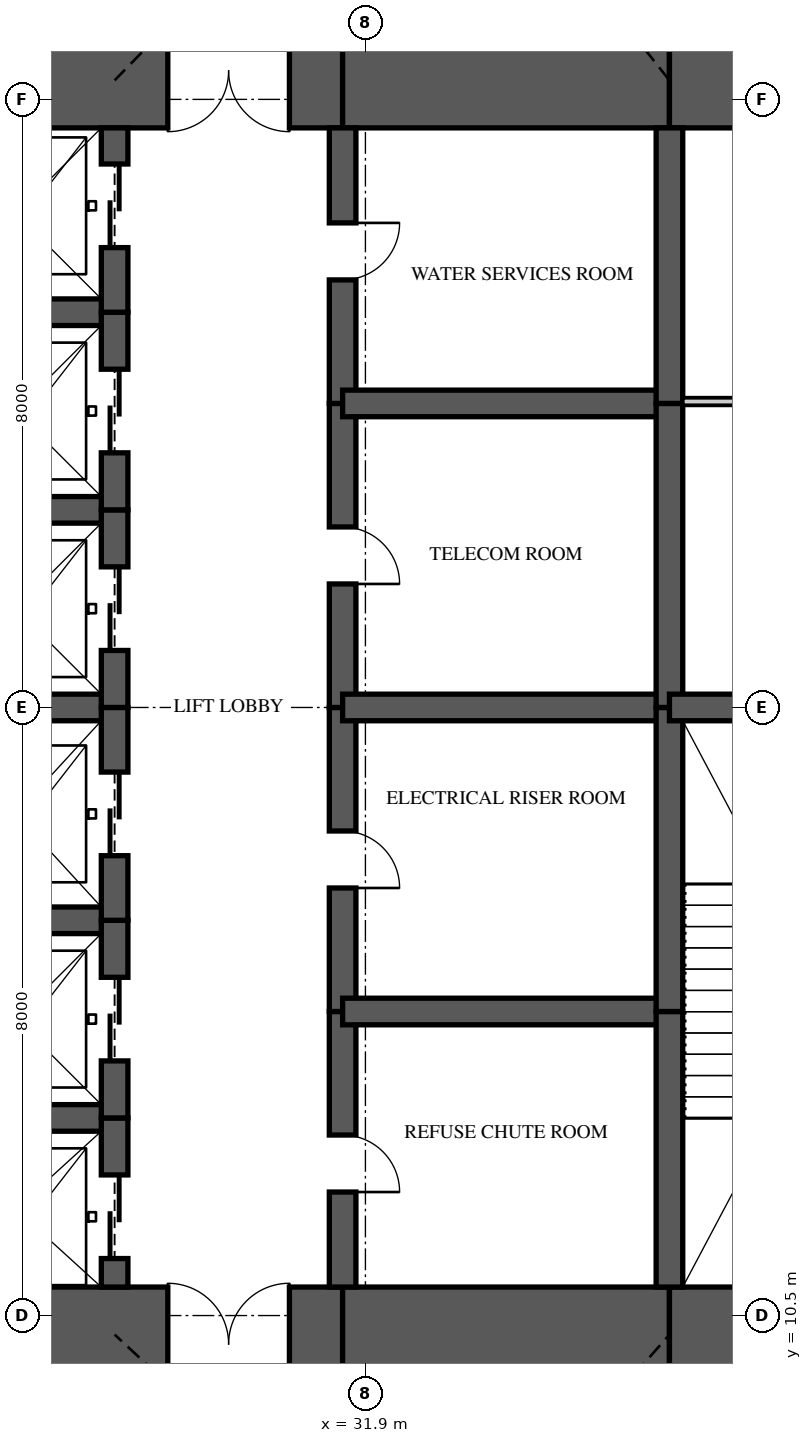
"""IFC4 building model, lengths in metres.
Left out: names, types, materials, properties, quantities, classifications, styles, units other than length and angle.
Written with IfcOpenShell. Run it as: python <this file> out.ifc"""

import sys

from ifc_helpers import new_model, si_unit, direction, frame, frame_2d, origin, place, context, subcontext, project, spatial, rectangle, extrude, element, fill, save


model = new_model("IFC4")
c1 = context("Model", 3, precision=1e-05, world=origin(), true_north=direction((0.0, 1.0)))
c2 = subcontext(c1, "Body", "Model", "MODEL_VIEW")
j1 = project(units=[si_unit("LENGTHUNIT", "METRE"), si_unit("PLANEANGLEUNIT", "RADIAN")], contexts=[c1])
p1 = place(None, origin())
s1 = spatial("IfcSite", under=j1, at=p1, CompositionType="ELEMENT")
p2 = place(p1, origin())
s2 = spatial("IfcBuilding", under=s1, at=p2, CompositionType="ELEMENT")
p3 = place(p2, frame((0.0, 0.0, 138.35)))
s3 = spatial("IfcBuildingStorey", under=s2, at=p3, CompositionType="ELEMENT", Elevation=138.35)
p4 = place(p3, frame((26.0, 10.125, 0.0), z_axis=(0.0, 0.0, 1.0), x_axis=(1.0, 0.0, 0.0)))
e1 = element("IfcWall", 1, at=p4, inside=s3, PredefinedType="SHEAR", context=c2, shape_type="SweptSolid", body=[
    extrude(rectangle(XDim=5.6, YDim=1.5, at=frame_2d((2.8, 0.0))), origin(), (0.0, 0.0, 1.0), 6.0),
])
p5 = place(p4, frame((3.3, 0.0, 0.0)))
e2 = element("IfcOpeningElement", 2, at=p5, cuts=e1, PredefinedType="OPENING", context=c2, shape_type="SweptSolid", body=[
    extrude(rectangle(XDim=1.6, YDim=2.1, at=frame_2d((0.8, 1.05))), frame((0.0, 0.76, 0.0), z_axis=(0.0, -1.0, 0.0), x_axis=(1.0, 0.0, 0.0)), (0.0, 0.0, 1.0), 1.52),
])
p6 = place(p3, frame((31.6, 10.125, 0.0), z_axis=(0.0, 0.0, 1.0), x_axis=(1.0, 0.0, 0.0)))
e3 = element("IfcWall", 3, at=p6, inside=s3, PredefinedType="SHEAR", context=c2, shape_type="SweptSolid", body=[
    extrude(rectangle(XDim=4.3, YDim=1.5, at=frame_2d((2.15, 0.0))), origin(), (0.0, 0.0, 1.0), 6.0),
])
p7 = place(p3, frame((35.9, 10.125, 0.0), z_axis=(0.0, 0.0, 1.0), x_axis=(1.0, 0.0, 0.0)))
e4 = element("IfcWall", 4, at=p7, inside=s3, PredefinedType="SHEAR", context=c2, shape_type="SweptSolid", body=[
    extrude(rectangle(XDim=8.325, YDim=1.5, at=frame_2d((4.163, 0.0))), origin(), (0.0, 0.0, 1.0), 6.0),
])
p8 = place(p7, frame((2.7, 0.0, 0.0)))
e5 = element("IfcOpeningElement", 5, at=p8, cuts=e4, PredefinedType="OPENING", context=c2, shape_type="SweptSolid", body=[
    extrude(rectangle(XDim=1.0, YDim=2.1, at=frame_2d((0.5, 1.05))), frame((0.0, 0.76, 0.0), z_axis=(0.0, -1.0, 0.0), x_axis=(1.0, 0.0, 0.0)), (0.0, 0.0, 1.0), 1.52),
])
p9 = place(p3, frame((44.225, 26.875, 0.0), z_axis=(0.0, 0.0, 1.0), x_axis=(-1.0, 0.0, 0.0)))
e6 = element("IfcWall", 6, at=p9, inside=s3, PredefinedType="SHEAR", context=c2, shape_type="SweptSolid", body=[
    extrude(rectangle(XDim=8.325, YDim=1.5, at=frame_2d((4.163, 0.0))), origin(), (0.0, 0.0, 1.0), 6.0),
])
p10 = place(p9, frame((5.725, 0.0, 0.0)))
e7 = element("IfcOpeningElement", 7, at=p10, cuts=e6, PredefinedType="OPENING", context=c2, shape_type="SweptSolid", body=[
    extrude(rectangle(XDim=0.9, YDim=2.1, at=frame_2d((0.45, 1.05))), frame((0.0, 0.76, 0.0), z_axis=(0.0, -1.0, 0.0), x_axis=(1.0, 0.0, 0.0)), (0.0, 0.0, 1.0), 1.52),
])
p11 = place(p3, frame((35.9, 26.875, 0.0), z_axis=(0.0, 0.0, 1.0), x_axis=(-1.0, 0.0, 0.0)))
e8 = element("IfcWall", 8, at=p11, inside=s3, PredefinedType="SHEAR", context=c2, shape_type="SweptSolid", body=[
    extrude(rectangle(XDim=4.3, YDim=1.5, at=frame_2d((2.15, 0.0))), origin(), (0.0, 0.0, 1.0), 6.0),
])
p12 = place(p3, frame((31.6, 26.875, 0.0), z_axis=(0.0, 0.0, 1.0), x_axis=(-1.0, 0.0, 0.0)))
e9 = element("IfcWall", 9, at=p12, inside=s3, PredefinedType="SHEAR", context=c2, shape_type="SweptSolid", body=[
    extrude(rectangle(XDim=5.6, YDim=1.5, at=frame_2d((2.8, 0.0))), origin(), (0.0, 0.0, 1.0), 6.0),
])
p13 = place(p12, frame((0.7, 0.0, 0.0)))
e10 = element("IfcOpeningElement", 10, at=p13, cuts=e9, PredefinedType="OPENING", context=c2, shape_type="SweptSolid", body=[
    extrude(rectangle(XDim=1.6, YDim=2.1, at=frame_2d((0.8, 1.05))), frame((0.0, 0.76, 0.0), z_axis=(0.0, -1.0, 0.0), x_axis=(1.0, 0.0, 0.0)), (0.0, 0.0, 1.0), 1.52),
])
p14 = place(p3, frame((28.6, 10.875, 0.0), z_axis=(0.0, 0.0, 1.0), x_axis=(0.0, 1.0, 0.0)))
e11 = element("IfcWall", 11, at=p14, inside=s3, PredefinedType="SHEAR", context=c2, shape_type="SweptSolid", body=[
    extrude(rectangle(XDim=2.225, YDim=0.35, at=frame_2d((1.113, 0.0))), origin(), (0.0, 0.0, 1.0), 6.0),
])
p15 = place(p14, frame((0.375, 0.0, 0.0)))
e12 = element("IfcOpeningElement", 12, at=p15, cuts=e11, PredefinedType="OPENING", context=c2, shape_type="SweptSolid", body=[
    extrude(rectangle(XDim=1.1, YDim=2.1, at=frame_2d((0.55, 1.05))), frame((0.0, 0.185, 0.0), z_axis=(0.0, -1.0, 0.0), x_axis=(1.0, 0.0, 0.0)), (0.0, 0.0, 1.0), 0.37),
])
p16 = place(p3, frame((28.6, 13.1, 0.0), z_axis=(0.0, 0.0, 1.0), x_axis=(0.0, 1.0, 0.0)))
e13 = element("IfcWall", 13, at=p16, inside=s3, PredefinedType="SHEAR", context=c2, shape_type="SweptSolid", body=[
    extrude(rectangle(XDim=2.6, YDim=0.35, at=frame_2d((1.3, 0.0))), origin(), (0.0, 0.0, 1.0), 6.0),
])
p17 = place(p16, frame((0.75, 0.0, 0.0)))
e14 = element("IfcOpeningElement", 14, at=p17, cuts=e13, PredefinedType="OPENING", context=c2, shape_type="SweptSolid", body=[
    extrude(rectangle(XDim=1.1, YDim=2.1, at=frame_2d((0.55, 1.05))), frame((0.0, 0.185, 0.0), z_axis=(0.0, -1.0, 0.0), x_axis=(1.0, 0.0, 0.0)), (0.0, 0.0, 1.0), 0.37),
])
p18 = place(p3, frame((28.6, 15.7, 0.0), z_axis=(0.0, 0.0, 1.0), x_axis=(0.0, 1.0, 0.0)))
e15 = element("IfcWall", 15, at=p18, inside=s3, PredefinedType="SHEAR", context=c2, shape_type="SweptSolid", body=[
    extrude(rectangle(XDim=2.8, YDim=0.35, at=frame_2d((1.4, 0.0))), origin(), (0.0, 0.0, 1.0), 6.0),
])
p19 = place(p18, frame((0.85, 0.0, 0.0)))
e16 = element("IfcOpeningElement", 16, at=p19, cuts=e15, PredefinedType="OPENING", context=c2, shape_type="SweptSolid", body=[
    extrude(rectangle(XDim=1.1, YDim=2.1, at=frame_2d((0.55, 1.05))), frame((0.0, 0.185, 0.0), z_axis=(0.0, -1.0, 0.0), x_axis=(1.0, 0.0, 0.0)), (0.0, 0.0, 1.0), 0.37),
])
p20 = place(p3, frame((28.6, 18.5, 0.0), z_axis=(0.0, 0.0, 1.0), x_axis=(0.0, 1.0, 0.0)))
e17 = element("IfcWall", 17, at=p20, inside=s3, PredefinedType="SHEAR", context=c2, shape_type="SweptSolid", body=[
    extrude(rectangle(XDim=2.6, YDim=0.35, at=frame_2d((1.3, 0.0))), origin(), (0.0, 0.0, 1.0), 6.0),
])
p21 = place(p20, frame((0.75, 0.0, 0.0)))
e18 = element("IfcOpeningElement", 18, at=p21, cuts=e17, PredefinedType="OPENING", context=c2, shape_type="SweptSolid", body=[
    extrude(rectangle(XDim=1.1, YDim=2.1, at=frame_2d((0.55, 1.05))), frame((0.0, 0.185, 0.0), z_axis=(0.0, -1.0, 0.0), x_axis=(1.0, 0.0, 0.0)), (0.0, 0.0, 1.0), 0.37),
])
p22 = place(p3, frame((28.6, 21.1, 0.0), z_axis=(0.0, 0.0, 1.0), x_axis=(0.0, 1.0, 0.0)))
e19 = element("IfcWall", 19, at=p22, inside=s3, PredefinedType="SHEAR", context=c2, shape_type="SweptSolid", body=[
    extrude(rectangle(XDim=2.6, YDim=0.35, at=frame_2d((1.3, 0.0))), origin(), (0.0, 0.0, 1.0), 6.0),
])
p23 = place(p22, frame((0.75, 0.0, 0.0)))
e20 = element("IfcOpeningElement", 20, at=p23, cuts=e19, PredefinedType="OPENING", context=c2, shape_type="SweptSolid", body=[
    extrude(rectangle(XDim=1.1, YDim=2.1, at=frame_2d((0.55, 1.05))), frame((0.0, 0.185, 0.0), z_axis=(0.0, -1.0, 0.0), x_axis=(1.0, 0.0, 0.0)), (0.0, 0.0, 1.0), 0.37),
])
p24 = place(p3, frame((28.6, 23.7, 0.0), z_axis=(0.0, 0.0, 1.0), x_axis=(0.0, 1.0, 0.0)))
e21 = element("IfcWall", 21, at=p24, inside=s3, PredefinedType="SHEAR", context=c2, shape_type="SweptSolid", body=[
    extrude(rectangle(XDim=2.425, YDim=0.35, at=frame_2d((1.212, 0.0))), origin(), (0.0, 0.0, 1.0), 6.0),
])
p25 = place(p24, frame((0.85, 0.0, 0.0)))
e22 = element("IfcOpeningElement", 22, at=p25, cuts=e21, PredefinedType="OPENING", context=c2, shape_type="SweptSolid", body=[
    extrude(rectangle(XDim=1.1, YDim=2.1, at=frame_2d((0.55, 1.05))), frame((0.0, 0.185, 0.0), z_axis=(0.0, -1.0, 0.0), x_axis=(1.0, 0.0, 0.0)), (0.0, 0.0, 1.0), 0.37),
])
p26 = place(p3, frame((31.6, 10.875, 0.0), z_axis=(0.0, 0.0, 1.0), x_axis=(0.0, 1.0, 0.0)))
e23 = element("IfcWall", 23, at=p26, inside=s3, PredefinedType="SHEAR", context=c2, shape_type="SweptSolid", body=[
    extrude(rectangle(XDim=3.625, YDim=0.35, at=frame_2d((1.812, 0.0))), origin(), (0.0, 0.0, 1.0), 6.0),
])
p27 = place(p26, frame((1.25, 0.0, 0.0)))
e24 = element("IfcOpeningElement", 24, at=p27, cuts=e23, PredefinedType="OPENING", context=c2, shape_type="SweptSolid", body=[
    extrude(rectangle(XDim=0.75, YDim=2.1, at=frame_2d((0.375, 1.05))), frame((0.0, 0.185, 0.0), z_axis=(0.0, -1.0, 0.0), x_axis=(1.0, 0.0, 0.0)), (0.0, 0.0, 1.0), 0.37),
])
p28 = place(p3, frame((31.6, 14.5, 0.0), z_axis=(0.0, 0.0, 1.0), x_axis=(0.0, 1.0, 0.0)))
e25 = element("IfcWall", 25, at=p28, inside=s3, PredefinedType="SHEAR", context=c2, shape_type="SweptSolid", body=[
    extrude(rectangle(XDim=4.0, YDim=0.35, at=frame_2d((2.0, 0.0))), origin(), (0.0, 0.0, 1.0), 6.0),
])
p29 = place(p28, frame((1.625, 0.0, 0.0)))
e26 = element("IfcOpeningElement", 26, at=p29, cuts=e25, PredefinedType="OPENING", context=c2, shape_type="SweptSolid", body=[
    extrude(rectangle(XDim=0.75, YDim=2.1, at=frame_2d((0.375, 1.05))), frame((0.0, 0.185, 0.0), z_axis=(0.0, -1.0, 0.0), x_axis=(1.0, 0.0, 0.0)), (0.0, 0.0, 1.0), 0.37),
])
p30 = place(p3, frame((31.6, 18.5, 0.0), z_axis=(0.0, 0.0, 1.0), x_axis=(0.0, 1.0, 0.0)))
e27 = element("IfcWall", 27, at=p30, inside=s3, PredefinedType="SHEAR", context=c2, shape_type="SweptSolid", body=[
    extrude(rectangle(XDim=4.0, YDim=0.35, at=frame_2d((2.0, 0.0))), origin(), (0.0, 0.0, 1.0), 6.0),
])
p31 = place(p30, frame((1.625, 0.0, 0.0)))
e28 = element("IfcOpeningElement", 28, at=p31, cuts=e27, PredefinedType="OPENING", context=c2, shape_type="SweptSolid", body=[
    extrude(rectangle(XDim=0.75, YDim=2.1, at=frame_2d((0.375, 1.05))), frame((0.0, 0.185, 0.0), z_axis=(0.0, -1.0, 0.0), x_axis=(1.0, 0.0, 0.0)), (0.0, 0.0, 1.0), 0.37),
])
p32 = place(p3, frame((31.6, 22.5, 0.0), z_axis=(0.0, 0.0, 1.0), x_axis=(0.0, 1.0, 0.0)))
e29 = element("IfcWall", 29, at=p32, inside=s3, PredefinedType="SHEAR", context=c2, shape_type="SweptSolid", body=[
    extrude(rectangle(XDim=3.625, YDim=0.35, at=frame_2d((1.812, 0.0))), origin(), (0.0, 0.0, 1.0), 6.0),
])
p33 = place(p32, frame((1.625, 0.0, 0.0)))
e30 = element("IfcOpeningElement", 30, at=p33, cuts=e29, PredefinedType="OPENING", context=c2, shape_type="SweptSolid", body=[
    extrude(rectangle(XDim=0.75, YDim=2.1, at=frame_2d((0.375, 1.05))), frame((0.0, 0.185, 0.0), z_axis=(0.0, -1.0, 0.0), x_axis=(1.0, 0.0, 0.0)), (0.0, 0.0, 1.0), 0.37),
])
p34 = place(p3, frame((35.9, 10.875, 0.0), z_axis=(0.0, 0.0, 1.0), x_axis=(0.0, 1.0, 0.0)))
e31 = element("IfcWall", 31, at=p34, inside=s3, PredefinedType="SHEAR", context=c2, shape_type="SweptSolid", body=[
    extrude(rectangle(XDim=3.625, YDim=0.35, at=frame_2d((1.812, 0.0))), origin(), (0.0, 0.0, 1.0), 6.0),
])
for number, where, z_axis, x_axis in (
    (32, (35.9, 14.5, 0.0), (0.0, 0.0, 1.0), (0.0, 1.0, 0.0)),
    (33, (35.9, 18.5, 0.0), (0.0, 0.0, 1.0), (0.0, 1.0, 0.0)),
):
    element("IfcWall", number, at=place(p3, frame(where, z_axis=z_axis, x_axis=x_axis)), inside=s3, PredefinedType="SHEAR", context=c2, shape_type="SweptSolid", body=[
        extrude(rectangle(XDim=4.0, YDim=0.35, at=frame_2d((2.0, 0.0))), origin(), (0.0, 0.0, 1.0), 6.0),
    ])
p35 = place(p3, frame((35.9, 22.5, 0.0), z_axis=(0.0, 0.0, 1.0), x_axis=(0.0, 1.0, 0.0)))
e34 = element("IfcWall", 34, at=p35, inside=s3, PredefinedType="SHEAR", context=c2, shape_type="SweptSolid", body=[
    extrude(rectangle(XDim=3.625, YDim=0.35, at=frame_2d((1.812, 0.0))), origin(), (0.0, 0.0, 1.0), 6.0),
])
for number, where, z_axis, x_axis in (
    (35, (26.0, 13.1, 0.0), (0.0, 0.0, 1.0), (1.0, 0.0, 0.0)),
    (36, (26.0, 15.7, 0.0), (0.0, 0.0, 1.0), (1.0, 0.0, 0.0)),
    (37, (26.0, 18.5, 0.0), (0.0, 0.0, 1.0), (1.0, 0.0, 0.0)),
    (38, (26.0, 21.1, 0.0), (0.0, 0.0, 1.0), (1.0, 0.0, 0.0)),
    (39, (26.0, 23.7, 0.0), (0.0, 0.0, 1.0), (1.0, 0.0, 0.0)),
):
    element("IfcWall", number, at=place(p3, frame(where, z_axis=z_axis, x_axis=x_axis)), inside=s3, PredefinedType="SHEAR", context=c2, shape_type="SweptSolid", body=[
        extrude(rectangle(XDim=2.6, YDim=0.35, at=frame_2d((1.3, 0.0))), origin(), (0.0, 0.0, 1.0), 6.0),
    ])
for number, where, z_axis, x_axis in (
    (40, (31.6, 14.5, 0.0), (0.0, 0.0, 1.0), (1.0, 0.0, 0.0)),
    (41, (31.6, 18.5, 0.0), (0.0, 0.0, 1.0), (1.0, 0.0, 0.0)),
    (42, (31.6, 22.5, 0.0), (0.0, 0.0, 1.0), (1.0, 0.0, 0.0)),
):
    element("IfcWall", number, at=place(p3, frame(where, z_axis=z_axis, x_axis=x_axis)), inside=s3, PredefinedType="SHEAR", context=c2, shape_type="SweptSolid", body=[
        extrude(rectangle(XDim=4.3, YDim=0.35, at=frame_2d((2.15, 0.0))), origin(), (0.0, 0.0, 1.0), 6.0),
    ])
p36 = place(p3, frame((35.9, 18.5, 0.0), z_axis=(0.0, 0.0, 1.0), x_axis=(1.0, 0.0, 0.0)))
e43 = element("IfcWall", 43, at=p36, inside=s3, PredefinedType="SHEAR", context=c2, shape_type="SweptSolid", body=[
    extrude(rectangle(XDim=4.3, YDim=0.35, at=frame_2d((2.15, 0.0))), origin(), (0.0, 0.0, 1.0), 6.0),
])
p37 = place(p3, frame((36.075, 22.525, 0.0), z_axis=(0.0, 0.0, 1.0), x_axis=(1.0, 0.0, 0.0)))
e44 = element("IfcWall", 44, at=p37, inside=s3, PredefinedType="PARTITIONING", context=c2, shape_type="SweptSolid", body=[
    extrude(rectangle(XDim=3.95, YDim=0.1, at=frame_2d((1.975, 0.0))), origin(), (0.0, 0.0, 1.0), 5.72),
])
p38 = place(p37, frame((1.525, 0.0, 0.0)))
e45 = element("IfcOpeningElement", 45, at=p38, cuts=e44, PredefinedType="OPENING", context=c2, shape_type="SweptSolid", body=[
    extrude(rectangle(XDim=0.9, YDim=2.1, at=frame_2d((0.45, 1.05))), frame((0.0, 0.06, 0.0), z_axis=(0.0, -1.0, 0.0), x_axis=(1.0, 0.0, 0.0)), (0.0, 0.0, 1.0), 0.12),
])
p39 = place(p15, origin())
e46 = element("IfcDoor", 46, at=p39, inside=s3, OperationType="SLIDING_TO_LEFT", PredefinedType="DOOR", context=c2, shape_type="SweptSolid", body=[
    extrude(rectangle(XDim=1.1, YDim=2.1, at=frame_2d((0.55, 1.05))), frame((0.0, 0.025, 0.0), z_axis=(0.0, -1.0, 0.0), x_axis=(1.0, 0.0, 0.0)), (0.0, 0.0, 1.0), 0.05),
])
fill(e12, e46)
p40 = place(p17, origin())
e47 = element("IfcDoor", 47, at=p40, inside=s3, OperationType="SLIDING_TO_LEFT", PredefinedType="DOOR", context=c2, shape_type="SweptSolid", body=[
    extrude(rectangle(XDim=1.1, YDim=2.1, at=frame_2d((0.55, 1.05))), frame((0.0, 0.025, 0.0), z_axis=(0.0, -1.0, 0.0), x_axis=(1.0, 0.0, 0.0)), (0.0, 0.0, 1.0), 0.05),
])
fill(e14, e47)
p41 = place(p19, origin())
e48 = element("IfcDoor", 48, at=p41, inside=s3, OperationType="SLIDING_TO_LEFT", PredefinedType="DOOR", context=c2, shape_type="SweptSolid", body=[
    extrude(rectangle(XDim=1.1, YDim=2.1, at=frame_2d((0.55, 1.05))), frame((0.0, 0.025, 0.0), z_axis=(0.0, -1.0, 0.0), x_axis=(1.0, 0.0, 0.0)), (0.0, 0.0, 1.0), 0.05),
])
fill(e16, e48)
p42 = place(p21, origin())
e49 = element("IfcDoor", 49, at=p42, inside=s3, OperationType="SLIDING_TO_LEFT", PredefinedType="DOOR", context=c2, shape_type="SweptSolid", body=[
    extrude(rectangle(XDim=1.1, YDim=2.1, at=frame_2d((0.55, 1.05))), frame((0.0, 0.025, 0.0), z_axis=(0.0, -1.0, 0.0), x_axis=(1.0, 0.0, 0.0)), (0.0, 0.0, 1.0), 0.05),
])
fill(e18, e49)
p43 = place(p23, origin())
e50 = element("IfcDoor", 50, at=p43, inside=s3, OperationType="SLIDING_TO_LEFT", PredefinedType="DOOR", context=c2, shape_type="SweptSolid", body=[
    extrude(rectangle(XDim=1.1, YDim=2.1, at=frame_2d((0.55, 1.05))), frame((0.0, 0.025, 0.0), z_axis=(0.0, -1.0, 0.0), x_axis=(1.0, 0.0, 0.0)), (0.0, 0.0, 1.0), 0.05),
])
fill(e20, e50)
p44 = place(p25, origin())
e51 = element("IfcDoor", 51, at=p44, inside=s3, OperationType="SLIDING_TO_LEFT", PredefinedType="DOOR", context=c2, shape_type="SweptSolid", body=[
    extrude(rectangle(XDim=1.1, YDim=2.1, at=frame_2d((0.55, 1.05))), frame((0.0, 0.025, 0.0), z_axis=(0.0, -1.0, 0.0), x_axis=(1.0, 0.0, 0.0)), (0.0, 0.0, 1.0), 0.05),
])
fill(e22, e51)
p45 = place(p5, origin())
e52 = element("IfcDoor", 52, at=p45, inside=s3, OperationType="DOUBLE_DOOR_SINGLE_SWING", PredefinedType="DOOR", context=c2, shape_type="SweptSolid", body=[
    extrude(rectangle(XDim=1.6, YDim=2.1, at=frame_2d((0.8, 1.05))), frame((0.0, 0.025, 0.0), z_axis=(0.0, -1.0, 0.0), x_axis=(1.0, 0.0, 0.0)), (0.0, 0.0, 1.0), 0.05),
])
fill(e2, e52)
p46 = place(p13, origin())
e53 = element("IfcDoor", 53, at=p46, inside=s3, OperationType="DOUBLE_DOOR_SINGLE_SWING", PredefinedType="DOOR", context=c2, shape_type="SweptSolid", body=[
    extrude(rectangle(XDim=1.6, YDim=2.1, at=frame_2d((0.8, 1.05))), frame((0.0, 0.025, 0.0), z_axis=(0.0, -1.0, 0.0), x_axis=(1.0, 0.0, 0.0)), (0.0, 0.0, 1.0), 0.05),
])
fill(e10, e53)
p47 = place(p27, frame((0.75, 0.0, 0.0), z_axis=(0.0, 0.0, 1.0), x_axis=(-1.0, 0.0, 0.0)))
e54 = element("IfcDoor", 54, at=p47, inside=s3, OperationType="SINGLE_SWING_RIGHT", PredefinedType="DOOR", context=c2, shape_type="SweptSolid", body=[
    extrude(rectangle(XDim=0.75, YDim=2.1, at=frame_2d((0.375, 1.05))), frame((0.0, 0.025, 0.0), z_axis=(0.0, -1.0, 0.0), x_axis=(1.0, 0.0, 0.0)), (0.0, 0.0, 1.0), 0.05),
])
fill(e24, e54)
p48 = place(p29, frame((0.75, 0.0, 0.0), z_axis=(0.0, 0.0, 1.0), x_axis=(-1.0, 0.0, 0.0)))
e55 = element("IfcDoor", 55, at=p48, inside=s3, OperationType="SINGLE_SWING_RIGHT", PredefinedType="DOOR", context=c2, shape_type="SweptSolid", body=[
    extrude(rectangle(XDim=0.75, YDim=2.1, at=frame_2d((0.375, 1.05))), frame((0.0, 0.025, 0.0), z_axis=(0.0, -1.0, 0.0), x_axis=(1.0, 0.0, 0.0)), (0.0, 0.0, 1.0), 0.05),
])
fill(e26, e55)
p49 = place(p31, frame((0.75, 0.0, 0.0), z_axis=(0.0, 0.0, 1.0), x_axis=(-1.0, 0.0, 0.0)))
e56 = element("IfcDoor", 56, at=p49, inside=s3, OperationType="SINGLE_SWING_RIGHT", PredefinedType="DOOR", context=c2, shape_type="SweptSolid", body=[
    extrude(rectangle(XDim=0.75, YDim=2.1, at=frame_2d((0.375, 1.05))), frame((0.0, 0.025, 0.0), z_axis=(0.0, -1.0, 0.0), x_axis=(1.0, 0.0, 0.0)), (0.0, 0.0, 1.0), 0.05),
])
fill(e28, e56)
p50 = place(p33, frame((0.75, 0.0, 0.0), z_axis=(0.0, 0.0, 1.0), x_axis=(-1.0, 0.0, 0.0)))
e57 = element("IfcDoor", 57, at=p50, inside=s3, OperationType="SINGLE_SWING_LEFT", PredefinedType="DOOR", context=c2, shape_type="SweptSolid", body=[
    extrude(rectangle(XDim=0.75, YDim=2.1, at=frame_2d((0.375, 1.05))), frame((0.0, 0.025, 0.0), z_axis=(0.0, -1.0, 0.0), x_axis=(1.0, 0.0, 0.0)), (0.0, 0.0, 1.0), 0.05),
])
fill(e30, e57)
save(model, sys.argv[1])
